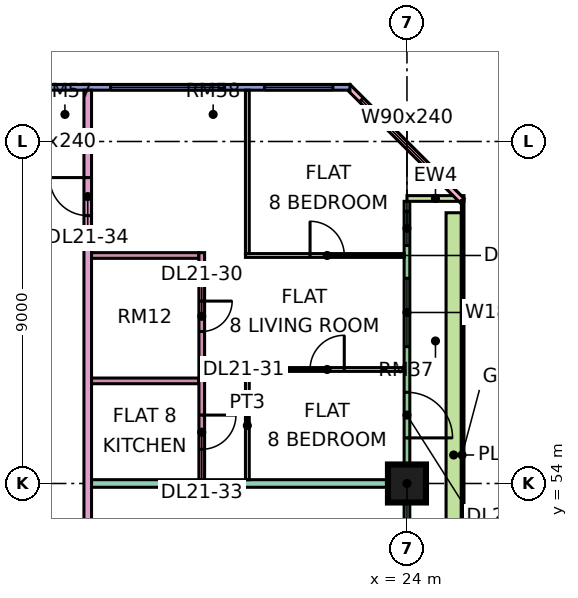
"""IFC4 building model, lengths in metres.
Left out: names, types, materials, properties, quantities, classifications, styles, units other than length and angle.
Written with IfcOpenShell. Run it as: python <this file> out.ifc"""

import sys

from ifc_helpers import new_model, si_unit, direction, frame, frame_2d, origin, origin_2d, place, context, subcontext, project, spatial, rectangle, extrude, element, fill, save


model = new_model("IFC4")
c1 = context("Model", 3, precision=1e-05, world=origin(), true_north=direction((0.0, 1.0)))
c2 = subcontext(c1, "Body", "Model", "MODEL_VIEW")
j1 = project(units=[si_unit("LENGTHUNIT", "METRE"), si_unit("PLANEANGLEUNIT", "RADIAN")], contexts=[c1])
p1 = place(None, origin())
s1 = spatial("IfcSite", under=j1, at=p1, CompositionType="ELEMENT")
p2 = place(p1, origin())
s2 = spatial("IfcBuilding", under=s1, at=p2, CompositionType="ELEMENT")
p3 = place(p2, frame((0.0, 0.0, 95.65)))
s3 = spatial("IfcBuildingStorey", under=s2, at=p3, CompositionType="ELEMENT", Elevation=95.65)
p4 = place(p3, frame((24.0, 54.0, 0.0), z_axis=(0.0, 0.0, 1.0), x_axis=(1.0, 0.0, 0.0)))
e1 = element("IfcColumn", 1, at=p4, inside=s3, PredefinedType="COLUMN", context=c2, shape_type="SweptSolid", body=[
    extrude(rectangle(XDim=1.0, YDim=1.0, at=origin_2d()), origin(), (0.0, 0.0, 1.0), 3.75),
])
p5 = place(p3, frame((24.0, 48.075, 0.0), z_axis=(0.0, 0.0, 1.0), x_axis=(0.0, 1.0, 0.0)))
e2 = element("IfcWall", 2, at=p5, inside=s3, PredefinedType="SOLIDWALL", context=c2, shape_type="SweptSolid", body=[
    extrude(rectangle(XDim=13.35, YDim=0.15, at=frame_2d((6.675, 0.0))), origin(), (0.0, 0.0, 1.0), 3.35),
])
p6 = place(p5, frame((0.562, 0.0, 0.45)))
e3 = element("IfcOpeningElement", 3, at=p6, cuts=e2, PredefinedType="OPENING", context=c2, shape_type="SweptSolid", body=[
    extrude(rectangle(XDim=4.2, YDim=2.4, at=frame_2d((2.1, 1.2))), frame((0.0, 0.085, 0.0), z_axis=(0.0, -1.0, 0.0), x_axis=(1.0, 0.0, 0.0)), (0.0, 0.0, 1.0), 0.17),
])
p7 = place(p5, frame((7.125, 0.0, 0.0)))
e4 = element("IfcOpeningElement", 4, at=p7, cuts=e2, PredefinedType="OPENING", context=c2, shape_type="SweptSolid", body=[
    extrude(rectangle(XDim=1.2, YDim=2.4, at=frame_2d((0.6, 1.2))), frame((0.0, 0.085, 0.0), z_axis=(0.0, -1.0, 0.0), x_axis=(1.0, 0.0, 0.0)), (0.0, 0.0, 1.0), 0.17),
])
p8 = place(p5, frame((9.525, 0.0, 0.45)))
e5 = element("IfcOpeningElement", 5, at=p8, cuts=e2, PredefinedType="OPENING", context=c2, shape_type="SweptSolid", body=[
    extrude(rectangle(XDim=1.8, YDim=2.4, at=frame_2d((0.9, 1.2))), frame((0.0, 0.085, 0.0), z_axis=(0.0, -1.0, 0.0), x_axis=(1.0, 0.0, 0.0)), (0.0, 0.0, 1.0), 0.17),
])
p9 = place(p5, frame((12.188, 0.0, 0.45)))
e6 = element("IfcOpeningElement", 6, at=p9, cuts=e2, PredefinedType="OPENING", context=c2, shape_type="SweptSolid", body=[
    extrude(rectangle(XDim=0.9, YDim=2.4, at=frame_2d((0.45, 1.2))), frame((0.0, 0.085, 0.0), z_axis=(0.0, -1.0, 0.0), x_axis=(1.0, 0.0, 0.0)), (0.0, 0.0, 1.0), 0.17),
])
p10 = place(p3, frame((25.5, 61.5, 0.0), z_axis=(0.0, 0.0, 1.0), x_axis=(-1.0, 0.0, 0.0)))
e7 = element("IfcWall", 7, at=p10, inside=s3, PredefinedType="SOLIDWALL", context=c2, shape_type="SweptSolid", body=[
    extrude(rectangle(XDim=1.5, YDim=0.15, at=frame_2d((0.75, 0.0))), origin(), (0.0, 0.0, 1.0), 3.35),
])
p11 = place(p3, frame((25.447, 61.447, 0.0), z_axis=(0.0, 0.0, 1.0), x_axis=(-0.707106781187, 0.707106781187, 0.0)))
e8 = element("IfcWall", 8, at=p11, inside=s3, PredefinedType="SOLIDWALL", context=c2, shape_type="SweptSolid", body=[
    extrude(rectangle(XDim=4.243, YDim=0.15, at=frame_2d((2.121, 0.0))), origin(), (0.0, 0.0, 1.0), 3.35),
])
p12 = place(p11, frame((0.744, 0.0, 0.45)))
e9 = element("IfcOpeningElement", 9, at=p12, cuts=e8, PredefinedType="OPENING", context=c2, shape_type="SweptSolid", body=[
    extrude(rectangle(XDim=3.0, YDim=2.4, at=frame_2d((1.5, 1.2))), frame((0.0, 0.085, 0.0), z_axis=(0.0, -1.0, 0.0), x_axis=(1.0, 0.0, 0.0)), (0.0, 0.0, 1.0), 0.17),
])
p13 = place(p3, frame((22.5, 64.425, 0.0), z_axis=(0.0, 0.0, 1.0), x_axis=(-1.0, 0.0, 0.0)))
e10 = element("IfcWall", 10, at=p13, inside=s3, PredefinedType="SOLIDWALL", context=c2, shape_type="SweptSolid", body=[
    extrude(rectangle(XDim=10.425, YDim=0.15, at=frame_2d((5.212, 0.0))), origin(), (0.0, 0.0, 1.0), 3.35),
])
p14 = place(p13, frame((0.45, 0.0, 0.45)))
e11 = element("IfcOpeningElement", 11, at=p14, cuts=e10, PredefinedType="OPENING", context=c2, shape_type="SweptSolid", body=[
    extrude(rectangle(XDim=1.8, YDim=2.4, at=frame_2d((0.9, 1.2))), frame((0.0, 0.085, 0.0), z_axis=(0.0, -1.0, 0.0), x_axis=(1.0, 0.0, 0.0)), (0.0, 0.0, 1.0), 0.17),
])
p15 = place(p13, frame((3.3, 0.0, 0.45)))
e12 = element("IfcOpeningElement", 12, at=p15, cuts=e10, PredefinedType="OPENING", context=c2, shape_type="SweptSolid", body=[
    extrude(rectangle(XDim=3.0, YDim=2.4, at=frame_2d((1.5, 1.2))), frame((0.0, 0.085, 0.0), z_axis=(0.0, -1.0, 0.0), x_axis=(1.0, 0.0, 0.0)), (0.0, 0.0, 1.0), 0.17),
])
p16 = place(p3, frame((25.229, 48.375, 0.0), z_axis=(0.0, 0.0, 1.0), x_axis=(0.0, 1.0, 0.0)))
e13 = element("IfcWall", 13, at=p16, inside=s3, PredefinedType="SOLIDWALL", context=c2, shape_type="SweptSolid", body=[
    extrude(rectangle(XDim=12.75, YDim=0.4, at=frame_2d((6.375, 0.0))), origin(), (0.0, 0.0, 1.0), 0.7),
])
p17 = place(p3, frame((15.6, 51.225, 0.0), z_axis=(0.0, 0.0, 1.0), x_axis=(0.0, 1.0, 0.0)))
e14 = element("IfcWall", 14, at=p17, inside=s3, PredefinedType="PARTITIONING", context=c2, shape_type="SweptSolid", body=[
    extrude(rectangle(XDim=13.125, YDim=0.2, at=frame_2d((6.562, 0.0))), origin(), (0.0, 0.0, 1.0), 3.35),
])
p18 = place(p17, frame((9.825, 0.0, 0.0)))
e15 = element("IfcOpeningElement", 15, at=p18, cuts=e14, PredefinedType="OPENING", context=c2, shape_type="SweptSolid", body=[
    extrude(rectangle(XDim=1.0, YDim=2.1, at=frame_2d((0.5, 1.05))), frame((0.0, 0.11, 0.0), z_axis=(0.0, -1.0, 0.0), x_axis=(1.0, 0.0, 0.0)), (0.0, 0.0, 1.0), 0.22),
])
p19 = place(p3, frame((15.7, 54.0, 0.0), z_axis=(0.0, 0.0, 1.0), x_axis=(1.0, 0.0, 0.0)))
e16 = element("IfcWall", 16, at=p19, inside=s3, PredefinedType="PARTITIONING", context=c2, shape_type="SweptSolid", body=[
    extrude(rectangle(XDim=8.226, YDim=0.2, at=frame_2d((4.113, 0.0))), origin(), (0.0, 0.0, 1.0), 3.35),
])
for number, where, z_axis, x_axis in (
    (17, (15.7, 56.7, 0.0), (0.0, 0.0, 1.0), (1.0, 0.0, 0.0)),
    (18, (15.7, 60.0, 0.0), (0.0, 0.0, 1.0), (1.0, 0.0, 0.0)),
):
    element("IfcWall", number, at=place(p3, frame(where, z_axis=z_axis, x_axis=x_axis)), inside=s3, PredefinedType="PARTITIONING", context=c2, shape_type="SweptSolid", body=[
        extrude(rectangle(XDim=2.825, YDim=0.15, at=frame_2d((1.413, 0.0))), origin(), (0.0, 0.0, 1.0), 3.35),
    ])
p20 = place(p3, frame((18.6, 54.1, 0.0), z_axis=(0.0, 0.0, 1.0), x_axis=(0.0, 1.0, 0.0)))
e19 = element("IfcWall", 19, at=p20, inside=s3, PredefinedType="PARTITIONING", context=c2, shape_type="SweptSolid", body=[
    extrude(rectangle(XDim=5.975, YDim=0.15, at=frame_2d((2.987, 0.0))), origin(), (0.0, 0.0, 1.0), 3.35),
])
p21 = place(p20, frame((3.9, 0.0, 0.0)))
e20 = element("IfcOpeningElement", 20, at=p21, cuts=e19, PredefinedType="OPENING", context=c2, shape_type="SweptSolid", body=[
    extrude(rectangle(XDim=0.8, YDim=2.1, at=frame_2d((0.4, 1.05))), frame((0.0, 0.085, 0.0), z_axis=(0.0, -1.0, 0.0), x_axis=(1.0, 0.0, 0.0)), (0.0, 0.0, 1.0), 0.17),
])
p22 = place(p20, frame((0.8, 0.0, 0.0)))
e21 = element("IfcOpeningElement", 21, at=p22, cuts=e19, PredefinedType="OPENING", context=c2, shape_type="SweptSolid", body=[
    extrude(rectangle(XDim=0.9, YDim=2.1, at=frame_2d((0.45, 1.05))), frame((0.0, 0.085, 0.0), z_axis=(0.0, -1.0, 0.0), x_axis=(1.0, 0.0, 0.0)), (0.0, 0.0, 1.0), 0.17),
])
p23 = place(p3, frame((19.75, 57.0, 0.0), z_axis=(0.0, 0.0, 1.0), x_axis=(1.0, 0.0, 0.0)))
e22 = element("IfcWall", 22, at=p23, inside=s3, PredefinedType="PARTITIONING", context=c2, shape_type="SweptSolid", body=[
    extrude(rectangle(XDim=4.176, YDim=0.1, at=frame_2d((2.088, 0.0))), origin(), (0.0, 0.0, 1.0), 3.35),
])
p24 = place(p23, frame((1.7, 0.0, 0.0)))
e23 = element("IfcOpeningElement", 23, at=p24, cuts=e22, PredefinedType="OPENING", context=c2, shape_type="SweptSolid", body=[
    extrude(rectangle(XDim=0.9, YDim=2.1, at=frame_2d((0.45, 1.05))), frame((0.0, 0.06, 0.0), z_axis=(0.0, -1.0, 0.0), x_axis=(1.0, 0.0, 0.0)), (0.0, 0.0, 1.0), 0.12),
])
p25 = place(p3, frame((19.75, 60.0, 0.0), z_axis=(0.0, 0.0, 1.0), x_axis=(1.0, 0.0, 0.0)))
e24 = element("IfcWall", 24, at=p25, inside=s3, PredefinedType="PARTITIONING", context=c2, shape_type="SweptSolid", body=[
    extrude(rectangle(XDim=4.176, YDim=0.1, at=frame_2d((2.088, 0.0))), origin(), (0.0, 0.0, 1.0), 3.35),
])
p26 = place(p25, frame((1.7, 0.0, 0.0)))
e25 = element("IfcOpeningElement", 25, at=p26, cuts=e24, PredefinedType="OPENING", context=c2, shape_type="SweptSolid", body=[
    extrude(rectangle(XDim=0.9, YDim=2.1, at=frame_2d((0.45, 1.05))), frame((0.0, 0.06, 0.0), z_axis=(0.0, -1.0, 0.0), x_axis=(1.0, 0.0, 0.0)), (0.0, 0.0, 1.0), 0.12),
])
p27 = place(p3, frame((19.8, 54.1, 0.0), z_axis=(0.0, 0.0, 1.0), x_axis=(0.0, 1.0, 0.0)))
e26 = element("IfcWall", 26, at=p27, inside=s3, PredefinedType="PARTITIONING", context=c2, shape_type="SweptSolid", body=[
    extrude(rectangle(XDim=2.85, YDim=0.1, at=frame_2d((1.425, 0.0))), origin(), (0.0, 0.0, 1.0), 3.35),
])
p28 = place(p3, frame((19.8, 60.05, 0.0), z_axis=(0.0, 0.0, 1.0), x_axis=(0.0, 1.0, 0.0)))
e27 = element("IfcWall", 27, at=p28, inside=s3, PredefinedType="PARTITIONING", context=c2, shape_type="SweptSolid", body=[
    extrude(rectangle(XDim=4.3, YDim=0.1, at=frame_2d((2.15, 0.0))), origin(), (0.0, 0.0, 1.0), 3.35),
])
p29 = place(p7, frame((1.2, 0.0, 0.0), z_axis=(0.0, 0.0, 1.0), x_axis=(-1.0, 0.0, 0.0)))
e28 = element("IfcDoor", 28, at=p29, inside=s3, OperationType="DOUBLE_DOOR_SINGLE_SWING", PredefinedType="DOOR", context=c2, shape_type="SweptSolid", body=[
    extrude(rectangle(XDim=1.2, YDim=2.4, at=frame_2d((0.6, 1.2))), frame((0.0, 0.025, 0.0), z_axis=(0.0, -1.0, 0.0), x_axis=(1.0, 0.0, 0.0)), (0.0, 0.0, 1.0), 0.05),
])
fill(e4, e28)
p30 = place(p8, origin())
e29 = element("IfcWindow", 29, at=p30, inside=s3, PartitioningType="SINGLE_PANEL", PredefinedType="WINDOW", context=c2, shape_type="SweptSolid", body=[
    extrude(rectangle(XDim=1.8, YDim=2.4, at=frame_2d((0.9, 1.2))), frame((0.0, 0.03, 0.0), z_axis=(0.0, -1.0, 0.0), x_axis=(1.0, 0.0, 0.0)), (0.0, 0.0, 1.0), 0.06),
])
fill(e5, e29)
p31 = place(p9, origin())
e30 = element("IfcWindow", 30, at=p31, inside=s3, PartitioningType="SINGLE_PANEL", PredefinedType="WINDOW", context=c2, shape_type="SweptSolid", body=[
    extrude(rectangle(XDim=0.9, YDim=2.4, at=frame_2d((0.45, 1.2))), frame((0.0, 0.03, 0.0), z_axis=(0.0, -1.0, 0.0), x_axis=(1.0, 0.0, 0.0)), (0.0, 0.0, 1.0), 0.06),
])
fill(e6, e30)
p32 = place(p12, origin())
e31 = element("IfcWindow", 31, at=p32, inside=s3, PartitioningType="SINGLE_PANEL", PredefinedType="WINDOW", context=c2, shape_type="SweptSolid", body=[
    extrude(rectangle(XDim=3.0, YDim=2.4, at=frame_2d((1.5, 1.2))), frame((0.0, 0.03, 0.0), z_axis=(0.0, -1.0, 0.0), x_axis=(1.0, 0.0, 0.0)), (0.0, 0.0, 1.0), 0.06),
])
fill(e9, e31)
p33 = place(p14, origin())
e32 = element("IfcWindow", 32, at=p33, inside=s3, PartitioningType="SINGLE_PANEL", PredefinedType="WINDOW", context=c2, shape_type="SweptSolid", body=[
    extrude(rectangle(XDim=1.8, YDim=2.4, at=frame_2d((0.9, 1.2))), frame((0.0, 0.03, 0.0), z_axis=(0.0, -1.0, 0.0), x_axis=(1.0, 0.0, 0.0)), (0.0, 0.0, 1.0), 0.06),
])
fill(e11, e32)
p34 = place(p15, origin())
e33 = element("IfcWindow", 33, at=p34, inside=s3, PartitioningType="SINGLE_PANEL", PredefinedType="WINDOW", context=c2, shape_type="SweptSolid", body=[
    extrude(rectangle(XDim=3.0, YDim=2.4, at=frame_2d((1.5, 1.2))), frame((0.0, 0.03, 0.0), z_axis=(0.0, -1.0, 0.0), x_axis=(1.0, 0.0, 0.0)), (0.0, 0.0, 1.0), 0.06),
])
fill(e12, e33)
p35 = place(p21, origin())
e34 = element("IfcDoor", 34, at=p35, inside=s3, OperationType="SINGLE_SWING_RIGHT", PredefinedType="DOOR", context=c2, shape_type="SweptSolid", body=[
    extrude(rectangle(XDim=0.8, YDim=2.1, at=frame_2d((0.4, 1.05))), frame((0.0, 0.025, 0.0), z_axis=(0.0, -1.0, 0.0), x_axis=(1.0, 0.0, 0.0)), (0.0, 0.0, 1.0), 0.05),
])
fill(e20, e34)
p36 = place(p24, frame((0.9, 0.0, 0.0), z_axis=(0.0, 0.0, 1.0), x_axis=(-1.0, 0.0, 0.0)))
e35 = element("IfcDoor", 35, at=p36, inside=s3, OperationType="SINGLE_SWING_RIGHT", PredefinedType="DOOR", context=c2, shape_type="SweptSolid", body=[
    extrude(rectangle(XDim=0.9, YDim=2.1, at=frame_2d((0.45, 1.05))), frame((0.0, 0.025, 0.0), z_axis=(0.0, -1.0, 0.0), x_axis=(1.0, 0.0, 0.0)), (0.0, 0.0, 1.0), 0.05),
])
fill(e23, e35)
p37 = place(p26, origin())
e36 = element("IfcDoor", 36, at=p37, inside=s3, OperationType="SINGLE_SWING_LEFT", PredefinedType="DOOR", context=c2, shape_type="SweptSolid", body=[
    extrude(rectangle(XDim=0.9, YDim=2.1, at=frame_2d((0.45, 1.05))), frame((0.0, 0.025, 0.0), z_axis=(0.0, -1.0, 0.0), x_axis=(1.0, 0.0, 0.0)), (0.0, 0.0, 1.0), 0.05),
])
fill(e25, e36)
p38 = place(p22, origin())
e37 = element("IfcDoor", 37, at=p38, inside=s3, OperationType="SINGLE_SWING_RIGHT", PredefinedType="DOOR", context=c2, shape_type="SweptSolid", body=[
    extrude(rectangle(XDim=0.9, YDim=2.1, at=frame_2d((0.45, 1.05))), frame((0.0, 0.025, 0.0), z_axis=(0.0, -1.0, 0.0), x_axis=(1.0, 0.0, 0.0)), (0.0, 0.0, 1.0), 0.05),
])
fill(e21, e37)
p39 = place(p18, frame((1.0, 0.0, 0.0), z_axis=(0.0, 0.0, 1.0), x_axis=(-1.0, 0.0, 0.0)))
e38 = element("IfcDoor", 38, at=p39, inside=s3, OperationType="SINGLE_SWING_RIGHT", PredefinedType="DOOR", context=c2, shape_type="SweptSolid", body=[
    extrude(rectangle(XDim=1.0, YDim=2.1, at=frame_2d((0.5, 1.05))), frame((0.0, 0.025, 0.0), z_axis=(0.0, -1.0, 0.0), x_axis=(1.0, 0.0, 0.0)), (0.0, 0.0, 1.0), 0.05),
])
fill(e15, e38)
save(model, sys.argv[1])
